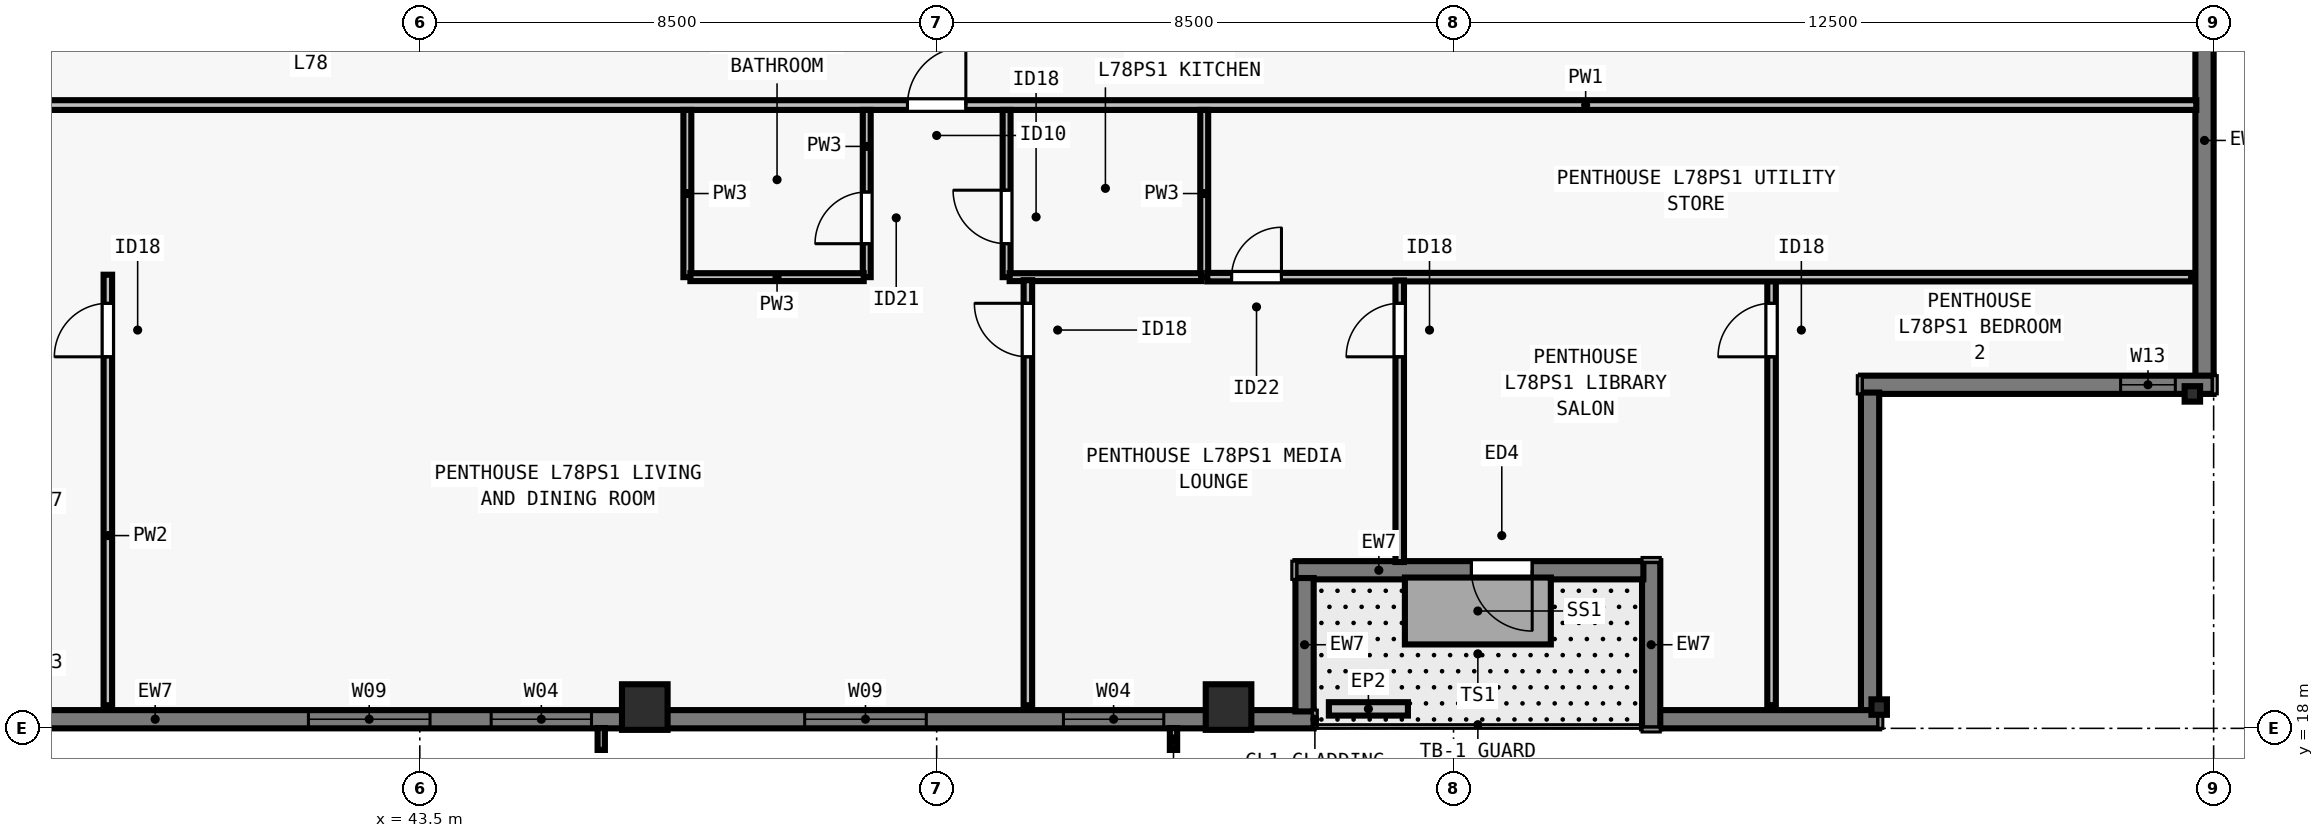
"""IFC4 building model, lengths in metres.
Left out: names, types, materials, properties, quantities, classifications, styles, units other than length and angle.
Written with IfcOpenShell. Run it as: python <this file> out.ifc"""

import sys

from ifc_helpers import new_model, si_unit, direction, frame, frame_2d, origin, origin_2d, place, context, subcontext, project, spatial, rectangle, i_section, extrude, element, fill, save


model = new_model("IFC4")
c1 = context("Model", 3, precision=1e-05, world=origin(), true_north=direction((0.0, 1.0)))
c2 = subcontext(c1, "Body", "Model", "MODEL_VIEW")
j1 = project(units=[si_unit("LENGTHUNIT", "METRE"), si_unit("PLANEANGLEUNIT", "RADIAN")], contexts=[c1])
p1 = place(None, origin())
s1 = spatial("IfcSite", under=j1, at=p1, CompositionType="ELEMENT")
p2 = place(p1, origin())
s2 = spatial("IfcBuilding", under=s1, at=p2, CompositionType="ELEMENT")
p3 = place(p2, frame((0.0, 0.0, 284.0)))
s3 = spatial("IfcBuildingStorey", under=s2, at=p3, CompositionType="ELEMENT", Elevation=284.0)
for number, where, z_axis, x_axis in (
    (1, (47.2, 18.35, 0.0), (0.0, 0.0, 1.0), (1.0, 0.0, 0.0)),
    (2, (56.8, 18.35, 0.0), (0.0, 0.0, 1.0), (1.0, 0.0, 0.0)),
):
    element("IfcColumn", number, at=place(p3, frame(where, z_axis=z_axis, x_axis=x_axis)), inside=s3, PredefinedType="COLUMN", context=c2, shape_type="SweptSolid", body=[
        extrude(rectangle(XDim=0.75, YDim=0.75, at=origin_2d()), origin(), (0.0, 0.0, 1.0), 3.5),
    ])
for number, where, z_axis, x_axis in (
    (3, (67.5, 18.35, 0.0), (0.0, 0.0, 1.0), (1.0, 0.0, 0.0)),
    (4, (72.65, 23.5, 0.0), (0.0, 0.0, 1.0), (0.0, 1.0, 0.0)),
):
    element("IfcColumn", number, at=place(p3, frame(where, z_axis=z_axis, x_axis=x_axis)), inside=s3, PredefinedType="COLUMN", context=c2, shape_type="SweptSolid", body=[
        extrude(i_section(OverallWidth=0.254, OverallDepth=0.254, WebThickness=0.009, FlangeThickness=0.014, FilletRadius=0.013, at=origin_2d()), origin(), (0.0, 0.0, 1.0), 3.5),
    ])
p4 = place(p3, frame((58.2, 18.15, 0.0), z_axis=(0.0, 0.0, 1.0), x_axis=(-1.0, 0.0, 0.0)))
e5 = element("IfcWall", 5, at=p4, inside=s3, PredefinedType="SOLIDWALL", context=c2, shape_type="SweptSolid", body=[
    extrude(rectangle(XDim=21.422, YDim=0.3, at=frame_2d((10.711, 0.0))), origin(), (0.0, 0.0, 1.0), 3.29),
])
p5 = place(p4, frame((2.465, 0.0, 0.8)))
e6 = element("IfcOpeningElement", 6, at=p5, cuts=e5, PredefinedType="OPENING", context=c2, shape_type="SweptSolid", body=[
    extrude(rectangle(XDim=1.65, YDim=1.758, at=frame_2d((0.825, 0.879))), frame((0.0, 0.16, 0.0), z_axis=(0.0, -1.0, 0.0), x_axis=(1.0, 0.0, 0.0)), (0.0, 0.0, 1.0), 0.32),
])
p6 = place(p4, frame((6.371, 0.0, 0.8)))
e7 = element("IfcOpeningElement", 7, at=p6, cuts=e5, PredefinedType="OPENING", context=c2, shape_type="SweptSolid", body=[
    extrude(rectangle(XDim=2.0, YDim=1.758, at=frame_2d((1.0, 0.879))), frame((0.0, 0.16, 0.0), z_axis=(0.0, -1.0, 0.0), x_axis=(1.0, 0.0, 0.0)), (0.0, 0.0, 1.0), 0.32),
])
p7 = place(p4, frame((11.876, 0.0, 0.8)))
e8 = element("IfcOpeningElement", 8, at=p7, cuts=e5, PredefinedType="OPENING", context=c2, shape_type="SweptSolid", body=[
    extrude(rectangle(XDim=1.65, YDim=1.758, at=frame_2d((0.825, 0.879))), frame((0.0, 0.16, 0.0), z_axis=(0.0, -1.0, 0.0), x_axis=(1.0, 0.0, 0.0)), (0.0, 0.0, 1.0), 0.32),
])
p8 = place(p4, frame((14.532, 0.0, 0.8)))
e9 = element("IfcOpeningElement", 9, at=p8, cuts=e5, PredefinedType="OPENING", context=c2, shape_type="SweptSolid", body=[
    extrude(rectangle(XDim=2.0, YDim=1.758, at=frame_2d((1.0, 0.879))), frame((0.0, 0.16, 0.0), z_axis=(0.0, -1.0, 0.0), x_axis=(1.0, 0.0, 0.0)), (0.0, 0.0, 1.0), 0.32),
])
p9 = place(p3, frame((72.85, 54.5, 0.0), z_axis=(0.0, 0.0, 1.0), x_axis=(0.0, -1.0, 0.0)))
e10 = element("IfcWall", 10, at=p9, inside=s3, PredefinedType="SOLIDWALL", context=c2, shape_type="SweptSolid", body=[
    extrude(rectangle(XDim=30.722, YDim=0.3, at=frame_2d((15.361, 0.0))), origin(), (0.0, 0.0, 1.0), 3.29),
])
p10 = place(p9, frame((7.756, 0.0, 0.8)))
e11 = element("IfcOpeningElement", 11, at=p10, cuts=e10, PredefinedType="OPENING", context=c2, shape_type="SweptSolid", body=[
    extrude(rectangle(XDim=2.0, YDim=1.758, at=frame_2d((1.0, 0.879))), frame((0.0, 0.16, 0.0), z_axis=(0.0, -1.0, 0.0), x_axis=(1.0, 0.0, 0.0)), (0.0, 0.0, 1.0), 0.32),
])
p11 = place(p9, frame((11.768, 0.0, 0.8)))
e12 = element("IfcOpeningElement", 12, at=p11, cuts=e10, PredefinedType="OPENING", context=c2, shape_type="SweptSolid", body=[
    extrude(rectangle(XDim=1.65, YDim=1.758, at=frame_2d((0.825, 0.879))), frame((0.0, 0.16, 0.0), z_axis=(0.0, -1.0, 0.0), x_axis=(1.0, 0.0, 0.0)), (0.0, 0.0, 1.0), 0.32),
])
p12 = place(p9, frame((16.28, 0.0, 0.8)))
e13 = element("IfcOpeningElement", 13, at=p12, cuts=e10, PredefinedType="OPENING", context=c2, shape_type="SweptSolid", body=[
    extrude(rectangle(XDim=2.0, YDim=1.758, at=frame_2d((1.0, 0.879))), frame((0.0, 0.16, 0.0), z_axis=(0.0, -1.0, 0.0), x_axis=(1.0, 0.0, 0.0)), (0.0, 0.0, 1.0), 0.32),
])
p13 = place(p9, frame((21.142, 0.0, 0.8)))
e14 = element("IfcOpeningElement", 14, at=p13, cuts=e10, PredefinedType="OPENING", context=c2, shape_type="SweptSolid", body=[
    extrude(rectangle(XDim=1.65, YDim=1.758, at=frame_2d((0.825, 0.879))), frame((0.0, 0.16, 0.0), z_axis=(0.0, -1.0, 0.0), x_axis=(1.0, 0.0, 0.0)), (0.0, 0.0, 1.0), 0.32),
])
p14 = place(p3, frame((73.0, 23.65, 0.0), z_axis=(0.0, 0.0, 1.0), x_axis=(-1.0, 0.0, 0.0)))
e15 = element("IfcWall", 15, at=p14, inside=s3, PredefinedType="SOLIDWALL", context=c2, shape_type="SweptSolid", body=[
    extrude(rectangle(XDim=5.8, YDim=0.3, at=frame_2d((2.9, 0.0))), origin(), (0.0, 0.0, 1.0), 3.29),
])
p15 = place(p14, frame((0.63, 0.0, 0.8)))
e16 = element("IfcOpeningElement", 16, at=p15, cuts=e15, PredefinedType="OPENING", context=c2, shape_type="SweptSolid", body=[
    extrude(rectangle(XDim=0.9, YDim=1.75, at=frame_2d((0.45, 0.875))), frame((0.0, 0.16, 0.0), z_axis=(0.0, -1.0, 0.0), x_axis=(1.0, 0.0, 0.0)), (0.0, 0.0, 1.0), 0.32),
])
p16 = place(p3, frame((67.35, 23.522, 0.0), z_axis=(0.0, 0.0, 1.0), x_axis=(0.0, -1.0, 0.0)))
e17 = element("IfcWall", 17, at=p16, inside=s3, PredefinedType="SOLIDWALL", context=c2, shape_type="SweptSolid", body=[
    extrude(rectangle(XDim=5.244, YDim=0.3, at=frame_2d((2.622, 0.0))), origin(), (0.0, 0.0, 1.0), 3.29),
])
p17 = place(p3, frame((67.5, 18.15, 0.0), z_axis=(0.0, 0.0, 1.0), x_axis=(-1.0, 0.0, 0.0)))
e18 = element("IfcWall", 18, at=p17, inside=s3, PredefinedType="SOLIDWALL", context=c2, shape_type="SweptSolid", body=[
    extrude(rectangle(XDim=3.622, YDim=0.3, at=frame_2d((1.811, 0.0))), origin(), (0.0, 0.0, 1.0), 3.29),
])
p18 = place(p3, frame((63.75, 18.0, 0.0), z_axis=(0.0, 0.0, 1.0), x_axis=(0.0, 1.0, 0.0)))
e19 = element("IfcWall", 19, at=p18, inside=s3, PredefinedType="SOLIDWALL", context=c2, shape_type="SweptSolid", body=[
    extrude(rectangle(XDim=2.75, YDim=0.3, at=frame_2d((1.375, 0.0))), origin(), (0.0, 0.0, 1.0), 3.29),
])
p19 = place(p3, frame((63.622, 20.6, 0.0), z_axis=(0.0, 0.0, 1.0), x_axis=(-1.0, 0.0, 0.0)))
e20 = element("IfcWall", 20, at=p19, inside=s3, PredefinedType="SOLIDWALL", context=c2, shape_type="SweptSolid", body=[
    extrude(rectangle(XDim=5.722, YDim=0.3, at=frame_2d((2.861, 0.0))), origin(), (0.0, 0.0, 1.0), 3.29),
])
p20 = place(p19, frame((1.829, 0.0, 0.0)))
e21 = element("IfcOpeningElement", 21, at=p20, cuts=e20, PredefinedType="OPENING", context=c2, shape_type="SweptSolid", body=[
    extrude(rectangle(XDim=1.0, YDim=2.15, at=frame_2d((0.5, 1.075))), frame((0.0, 0.16, 0.0), z_axis=(0.0, -1.0, 0.0), x_axis=(1.0, 0.0, 0.0)), (0.0, 0.0, 1.0), 0.32),
])
p21 = place(p3, frame((58.05, 20.472, 0.0), z_axis=(0.0, 0.0, 1.0), x_axis=(0.0, -1.0, 0.0)))
e22 = element("IfcWall", 22, at=p21, inside=s3, PredefinedType="SOLIDWALL", context=c2, shape_type="SweptSolid", body=[
    extrude(rectangle(XDim=2.194, YDim=0.3, at=frame_2d((1.097, 0.0))), origin(), (0.0, 0.0, 1.0), 3.29),
])
p22 = place(p3, frame((58.45, 18.32, 0.0), z_axis=(0.0, 0.0, 1.0), x_axis=(1.0, 0.0, 0.0)))
e23 = element("IfcWall", 23, at=p22, inside=s3, PredefinedType="PARAPET", context=c2, shape_type="SweptSolid", body=[
    extrude(rectangle(XDim=1.3, YDim=0.22, at=frame_2d((0.65, 0.0))), origin(), (0.0, 0.0, 1.0), 0.55),
])
p23 = place(p3, frame((31.285, 28.25, 0.0), z_axis=(0.0, 0.0, 1.0), x_axis=(1.0, 0.0, 0.0)))
e24 = element("IfcWall", 24, at=p23, inside=s3, PredefinedType="PARTITIONING", context=c2, shape_type="SweptSolid", body=[
    extrude(rectangle(XDim=41.43, YDim=0.16, at=frame_2d((20.715, 0.0))), origin(), (0.0, 0.0, 1.0), 3.009),
])
p24 = place(p23, frame((20.235, 0.0, 0.0)))
e25 = element("IfcOpeningElement", 25, at=p24, cuts=e24, PredefinedType="OPENING", context=c2, shape_type="SweptSolid", body=[
    extrude(rectangle(XDim=0.96, YDim=2.18, at=frame_2d((0.48, 1.09))), frame((0.0, 0.09, 0.0), z_axis=(0.0, -1.0, 0.0), x_axis=(1.0, 0.0, 0.0)), (0.0, 0.0, 1.0), 0.18),
])
p25 = place(p3, frame((47.9, 25.42, 0.0), z_axis=(0.0, 0.0, 1.0), x_axis=(0.0, 1.0, 0.0)))
e26 = element("IfcWall", 26, at=p25, inside=s3, PredefinedType="PLUMBINGWALL", context=c2, shape_type="SweptSolid", body=[
    extrude(rectangle(XDim=2.75, YDim=0.13, at=frame_2d((1.375, 0.0))), origin(), (0.0, 0.0, 1.0), 3.29),
])
p26 = place(p3, frame((50.85, 25.42, 0.0), z_axis=(0.0, 0.0, 1.0), x_axis=(0.0, 1.0, 0.0)))
e27 = element("IfcWall", 27, at=p26, inside=s3, PredefinedType="PLUMBINGWALL", context=c2, shape_type="SweptSolid", body=[
    extrude(rectangle(XDim=2.75, YDim=0.13, at=frame_2d((1.375, 0.0))), origin(), (0.0, 0.0, 1.0), 3.29),
])
p27 = place(p26, frame((0.55, 0.0, 0.0)))
e28 = element("IfcOpeningElement", 28, at=p27, cuts=e27, PredefinedType="OPENING", context=c2, shape_type="SweptSolid", body=[
    extrude(rectangle(XDim=0.85, YDim=2.08, at=frame_2d((0.425, 1.04))), frame((0.0, 0.075, 0.0), z_axis=(0.0, -1.0, 0.0), x_axis=(1.0, 0.0, 0.0)), (0.0, 0.0, 1.0), 0.15),
])
p28 = place(p3, frame((47.95, 25.42, 0.0), z_axis=(0.0, 0.0, 1.0), x_axis=(1.0, 0.0, 0.0)))
e29 = element("IfcWall", 29, at=p28, inside=s3, PredefinedType="PLUMBINGWALL", context=c2, shape_type="SweptSolid", body=[
    extrude(rectangle(XDim=2.85, YDim=0.13, at=frame_2d((1.425, 0.0))), origin(), (0.0, 0.0, 1.0), 3.29),
])
p29 = place(p3, frame((56.4, 25.42, 0.0), z_axis=(0.0, 0.0, 1.0), x_axis=(0.0, 1.0, 0.0)))
e30 = element("IfcWall", 30, at=p29, inside=s3, PredefinedType="PLUMBINGWALL", context=c2, shape_type="SweptSolid", body=[
    extrude(rectangle(XDim=2.75, YDim=0.13, at=frame_2d((1.375, 0.0))), origin(), (0.0, 0.0, 1.0), 3.29),
])
p30 = place(p3, frame((53.15, 25.42, 0.0), z_axis=(0.0, 0.0, 1.0), x_axis=(0.0, 1.0, 0.0)))
e31 = element("IfcWall", 31, at=p30, inside=s3, PredefinedType="PLUMBINGWALL", context=c2, shape_type="SweptSolid", body=[
    extrude(rectangle(XDim=2.75, YDim=0.13, at=frame_2d((1.375, 0.0))), origin(), (0.0, 0.0, 1.0), 3.009),
])
p31 = place(p30, frame((0.55, 0.0, 0.0)))
e32 = element("IfcOpeningElement", 32, at=p31, cuts=e31, PredefinedType="OPENING", context=c2, shape_type="SweptSolid", body=[
    extrude(rectangle(XDim=0.88, YDim=2.1, at=frame_2d((0.44, 1.05))), frame((0.0, 0.075, 0.0), z_axis=(0.0, -1.0, 0.0), x_axis=(1.0, 0.0, 0.0)), (0.0, 0.0, 1.0), 0.15),
])
p32 = place(p3, frame((53.2, 25.42, 0.0), z_axis=(0.0, 0.0, 1.0), x_axis=(1.0, 0.0, 0.0)))
e33 = element("IfcWall", 33, at=p32, inside=s3, PredefinedType="PLUMBINGWALL", context=c2, shape_type="SweptSolid", body=[
    extrude(rectangle(XDim=3.15, YDim=0.13, at=frame_2d((1.575, 0.0))), origin(), (0.0, 0.0, 1.0), 3.29),
])
p33 = place(p3, frame((38.37, 18.38, 0.0), z_axis=(0.0, 0.0, 1.0), x_axis=(0.0, 1.0, 0.0)))
e34 = element("IfcWall", 34, at=p33, inside=s3, PredefinedType="PARTITIONING", context=c2, shape_type="SweptSolid", body=[
    extrude(rectangle(XDim=7.08, YDim=0.14, at=frame_2d((3.54, 0.0))), origin(), (0.0, 0.0, 1.0), 2.653),
])
p34 = place(p33, frame((5.73, 0.0, 0.0)))
e35 = element("IfcOpeningElement", 35, at=p34, cuts=e34, PredefinedType="OPENING", context=c2, shape_type="SweptSolid", body=[
    extrude(rectangle(XDim=0.88, YDim=2.1, at=frame_2d((0.44, 1.05))), frame((0.0, 0.08, 0.0), z_axis=(0.0, -1.0, 0.0), x_axis=(1.0, 0.0, 0.0)), (0.0, 0.0, 1.0), 0.16),
])
p35 = place(p3, frame((65.73, 18.38, 0.0), z_axis=(0.0, 0.0, 1.0), x_axis=(0.0, 1.0, 0.0)))
e36 = element("IfcWall", 36, at=p35, inside=s3, PredefinedType="PARTITIONING", context=c2, shape_type="SweptSolid", body=[
    extrude(rectangle(XDim=7.08, YDim=0.14, at=frame_2d((3.54, 0.0))), origin(), (0.0, 0.0, 1.0), 2.653),
])
p36 = place(p35, frame((5.73, 0.0, 0.0)))
e37 = element("IfcOpeningElement", 37, at=p36, cuts=e36, PredefinedType="OPENING", context=c2, shape_type="SweptSolid", body=[
    extrude(rectangle(XDim=0.88, YDim=2.1, at=frame_2d((0.44, 1.05))), frame((0.0, 0.08, 0.0), z_axis=(0.0, -1.0, 0.0), x_axis=(1.0, 0.0, 0.0)), (0.0, 0.0, 1.0), 0.16),
])
p37 = place(p3, frame((56.45, 25.42, 0.0), z_axis=(0.0, 0.0, 1.0), x_axis=(1.0, 0.0, 0.0)))
e38 = element("IfcWall", 38, at=p37, inside=s3, PredefinedType="PARTITIONING", context=c2, shape_type="SweptSolid", body=[
    extrude(rectangle(XDim=16.18, YDim=0.14, at=frame_2d((8.09, 0.0))), origin(), (0.0, 0.0, 1.0), 3.009),
])
p38 = place(p37, frame((0.4, 0.0, 0.0)))
e39 = element("IfcOpeningElement", 39, at=p38, cuts=e38, PredefinedType="OPENING", context=c2, shape_type="SweptSolid", body=[
    extrude(rectangle(XDim=0.82, YDim=2.1, at=frame_2d((0.41, 1.05))), frame((0.0, 0.08, 0.0), z_axis=(0.0, -1.0, 0.0), x_axis=(1.0, 0.0, 0.0)), (0.0, 0.0, 1.0), 0.16),
])
p39 = place(p3, frame((53.5, 18.38, 0.0), z_axis=(0.0, 0.0, 1.0), x_axis=(0.0, 1.0, 0.0)))
e40 = element("IfcWall", 40, at=p39, inside=s3, PredefinedType="PARTITIONING", context=c2, shape_type="SweptSolid", body=[
    extrude(rectangle(XDim=6.99, YDim=0.14, at=frame_2d((3.495, 0.0))), origin(), (0.0, 0.0, 1.0), 3.29),
])
p40 = place(p39, frame((5.73, 0.0, 0.0)))
e41 = element("IfcOpeningElement", 41, at=p40, cuts=e40, PredefinedType="OPENING", context=c2, shape_type="SweptSolid", body=[
    extrude(rectangle(XDim=0.88, YDim=2.1, at=frame_2d((0.44, 1.05))), frame((0.0, 0.08, 0.0), z_axis=(0.0, -1.0, 0.0), x_axis=(1.0, 0.0, 0.0)), (0.0, 0.0, 1.0), 0.16),
])
p41 = place(p3, frame((59.615, 20.735, 0.0), z_axis=(0.0, 0.0, 1.0), x_axis=(0.0, 1.0, 0.0)))
e42 = element("IfcWall", 42, at=p41, inside=s3, PredefinedType="PARTITIONING", context=c2, shape_type="SweptSolid", body=[
    extrude(rectangle(XDim=4.63, YDim=0.14, at=frame_2d((2.315, 0.0))), origin(), (0.0, 0.0, 1.0), 3.29),
])
p42 = place(p41, frame((3.375, 0.0, 0.0)))
e43 = element("IfcOpeningElement", 43, at=p42, cuts=e42, PredefinedType="OPENING", context=c2, shape_type="SweptSolid", body=[
    extrude(rectangle(XDim=0.88, YDim=2.1, at=frame_2d((0.44, 1.05))), frame((0.0, 0.08, 0.0), z_axis=(0.0, -1.0, 0.0), x_axis=(1.0, 0.0, 0.0)), (0.0, 0.0, 1.0), 0.16),
])
p43 = place(p5, origin())
e44 = element("IfcWindow", 44, at=p43, inside=s3, PartitioningType="SINGLE_PANEL", PredefinedType="WINDOW", context=c2, shape_type="SweptSolid", body=[
    extrude(rectangle(XDim=1.65, YDim=1.758, at=frame_2d((0.825, 0.879))), frame((0.0, -0.05, 0.0), z_axis=(0.0, -1.0, 0.0), x_axis=(1.0, 0.0, 0.0)), (0.0, 0.0, 1.0), 0.06),
])
fill(e6, e44)
p44 = place(p6, origin())
e45 = element("IfcWindow", 45, at=p44, inside=s3, PartitioningType="SINGLE_PANEL", PredefinedType="WINDOW", context=c2, shape_type="SweptSolid", body=[
    extrude(rectangle(XDim=2.0, YDim=1.758, at=frame_2d((1.0, 0.879))), frame((0.0, -0.05, 0.0), z_axis=(0.0, -1.0, 0.0), x_axis=(1.0, 0.0, 0.0)), (0.0, 0.0, 1.0), 0.06),
])
fill(e7, e45)
p45 = place(p7, origin())
e46 = element("IfcWindow", 46, at=p45, inside=s3, PartitioningType="SINGLE_PANEL", PredefinedType="WINDOW", context=c2, shape_type="SweptSolid", body=[
    extrude(rectangle(XDim=1.65, YDim=1.758, at=frame_2d((0.825, 0.879))), frame((0.0, -0.05, 0.0), z_axis=(0.0, -1.0, 0.0), x_axis=(1.0, 0.0, 0.0)), (0.0, 0.0, 1.0), 0.06),
])
fill(e8, e46)
p46 = place(p8, origin())
e47 = element("IfcWindow", 47, at=p46, inside=s3, PartitioningType="SINGLE_PANEL", PredefinedType="WINDOW", context=c2, shape_type="SweptSolid", body=[
    extrude(rectangle(XDim=2.0, YDim=1.758, at=frame_2d((1.0, 0.879))), frame((0.0, -0.05, 0.0), z_axis=(0.0, -1.0, 0.0), x_axis=(1.0, 0.0, 0.0)), (0.0, 0.0, 1.0), 0.06),
])
fill(e9, e47)
p47 = place(p20, origin())
e48 = element("IfcDoor", 48, at=p47, inside=s3, OperationType="SINGLE_SWING_LEFT", PredefinedType="DOOR", context=c2, shape_type="SweptSolid", body=[
    extrude(rectangle(XDim=1.0, YDim=2.15, at=frame_2d((0.5, 1.075))), frame((0.0, 0.025, 0.0), z_axis=(0.0, -1.0, 0.0), x_axis=(1.0, 0.0, 0.0)), (0.0, 0.0, 1.0), 0.05),
])
fill(e21, e48)
p48 = place(p15, origin())
e49 = element("IfcWindow", 49, at=p48, inside=s3, PartitioningType="SINGLE_PANEL", PredefinedType="WINDOW", context=c2, shape_type="SweptSolid", body=[
    extrude(rectangle(XDim=0.9, YDim=1.75, at=frame_2d((0.45, 0.875))), frame((0.0, -0.04, 0.0), z_axis=(0.0, -1.0, 0.0), x_axis=(1.0, 0.0, 0.0)), (0.0, 0.0, 1.0), 0.06),
])
fill(e16, e49)
p49 = place(p27, origin())
e50 = element("IfcDoor", 50, at=p49, inside=s3, OperationType="SINGLE_SWING_LEFT", PredefinedType="DOOR", context=c2, shape_type="SweptSolid", body=[
    extrude(rectangle(XDim=0.85, YDim=2.08, at=frame_2d((0.425, 1.04))), frame((0.0, 0.025, 0.0), z_axis=(0.0, -1.0, 0.0), x_axis=(1.0, 0.0, 0.0)), (0.0, 0.0, 1.0), 0.05),
])
fill(e28, e50)
p50 = place(p31, origin())
e51 = element("IfcDoor", 51, at=p50, inside=s3, OperationType="SINGLE_SWING_RIGHT", PredefinedType="DOOR", context=c2, shape_type="SweptSolid", body=[
    extrude(rectangle(XDim=0.88, YDim=2.1, at=frame_2d((0.44, 1.05))), frame((0.0, 0.025, 0.0), z_axis=(0.0, -1.0, 0.0), x_axis=(1.0, 0.0, 0.0)), (0.0, 0.0, 1.0), 0.05),
])
fill(e32, e51)
p51 = place(p34, origin())
e52 = element("IfcDoor", 52, at=p51, inside=s3, OperationType="SINGLE_SWING_LEFT", PredefinedType="DOOR", context=c2, shape_type="SweptSolid", body=[
    extrude(rectangle(XDim=0.88, YDim=2.1, at=frame_2d((0.44, 1.05))), frame((0.0, 0.025, 0.0), z_axis=(0.0, -1.0, 0.0), x_axis=(1.0, 0.0, 0.0)), (0.0, 0.0, 1.0), 0.05),
])
fill(e35, e52)
p52 = place(p38, origin())
e53 = element("IfcDoor", 53, at=p52, inside=s3, OperationType="SINGLE_SWING_RIGHT", PredefinedType="DOOR", context=c2, shape_type="SweptSolid", body=[
    extrude(rectangle(XDim=0.82, YDim=2.1, at=frame_2d((0.41, 1.05))), frame((0.0, 0.025, 0.0), z_axis=(0.0, -1.0, 0.0), x_axis=(1.0, 0.0, 0.0)), (0.0, 0.0, 1.0), 0.05),
])
fill(e39, e53)
p53 = place(p36, origin())
e54 = element("IfcDoor", 54, at=p53, inside=s3, OperationType="SINGLE_SWING_LEFT", PredefinedType="DOOR", context=c2, shape_type="SweptSolid", body=[
    extrude(rectangle(XDim=0.88, YDim=2.1, at=frame_2d((0.44, 1.05))), frame((0.0, 0.025, 0.0), z_axis=(0.0, -1.0, 0.0), x_axis=(1.0, 0.0, 0.0)), (0.0, 0.0, 1.0), 0.05),
])
fill(e37, e54)
p54 = place(p40, origin())
e55 = element("IfcDoor", 55, at=p54, inside=s3, OperationType="SINGLE_SWING_RIGHT", PredefinedType="DOOR", context=c2, shape_type="SweptSolid", body=[
    extrude(rectangle(XDim=0.88, YDim=2.1, at=frame_2d((0.44, 1.05))), frame((0.0, 0.025, 0.0), z_axis=(0.0, -1.0, 0.0), x_axis=(1.0, 0.0, 0.0)), (0.0, 0.0, 1.0), 0.05),
])
fill(e41, e55)
p55 = place(p42, origin())
e56 = element("IfcDoor", 56, at=p55, inside=s3, OperationType="SINGLE_SWING_LEFT", PredefinedType="DOOR", context=c2, shape_type="SweptSolid", body=[
    extrude(rectangle(XDim=0.88, YDim=2.1, at=frame_2d((0.44, 1.05))), frame((0.0, 0.025, 0.0), z_axis=(0.0, -1.0, 0.0), x_axis=(1.0, 0.0, 0.0)), (0.0, 0.0, 1.0), 0.05),
])
fill(e43, e56)
p56 = place(p24, origin())
e57 = element("IfcDoor", 57, at=p56, inside=s3, OperationType="SINGLE_SWING_RIGHT", PredefinedType="DOOR", context=c2, shape_type="SweptSolid", body=[
    extrude(rectangle(XDim=0.96, YDim=2.18, at=frame_2d((0.48, 1.09))), frame((0.0, 0.025, 0.0), z_axis=(0.0, -1.0, 0.0), x_axis=(1.0, 0.0, 0.0)), (0.0, 0.0, 1.0), 0.05),
])
fill(e25, e57)
save(model, sys.argv[1])
